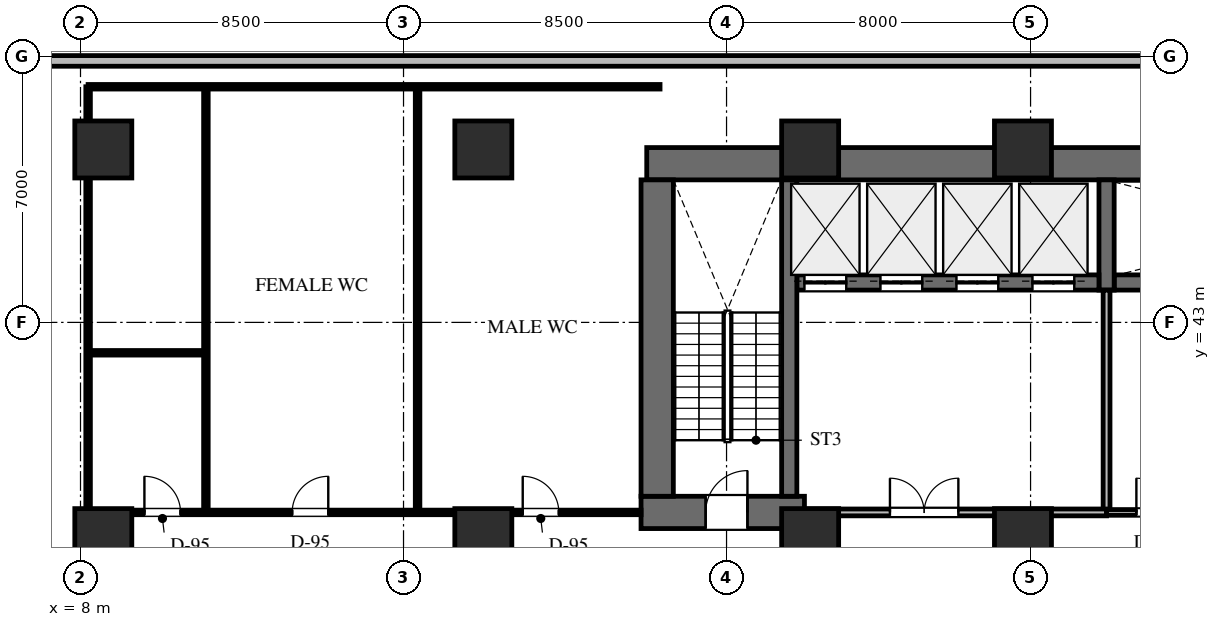
"""IFC4 building model, lengths in metres.
Left out: names, types, materials, properties, quantities, classifications, styles, units other than length and angle.
Written with IfcOpenShell. Run it as: python <this file> out.ifc"""

import sys

from ifc_helpers import new_model, si_unit, direction, frame, frame_2d, origin, origin_2d, place, context, subcontext, project, spatial, rectangle, extrude, element, fill, save


model = new_model("IFC4")
c1 = context("Model", 3, precision=1e-05, world=origin(), true_north=direction((0.0, 1.0)))
c2 = subcontext(c1, "Body", "Model", "MODEL_VIEW")
j1 = project(units=[si_unit("LENGTHUNIT", "METRE"), si_unit("PLANEANGLEUNIT", "RADIAN")], contexts=[c1])
p1 = place(None, origin())
s1 = spatial("IfcSite", under=j1, at=p1, CompositionType="ELEMENT")
p2 = place(p1, origin())
s2 = spatial("IfcBuilding", under=s1, at=p2, CompositionType="ELEMENT")
p3 = place(p2, frame((0.0, 0.0, 15.3)))
s3 = spatial("IfcBuildingStorey", under=s2, at=p3, CompositionType="ELEMENT", Elevation=15.3)
p4 = place(p3, frame((22.9, 47.175, 0.0), z_axis=(0.0, 0.0, 1.0), x_axis=(1.0, 0.0, 0.0)))
e1 = element("IfcWall", 1, at=p4, inside=s3, PredefinedType="SHEAR", context=c2, shape_type="SweptSolid", body=[
    extrude(rectangle(XDim=43.8, YDim=0.85, at=frame_2d((21.9, 0.0))), origin(), (0.0, 0.0, 1.0), 4.5),
])
p5 = place(p3, frame((35.2, 44.05, 0.0), z_axis=(0.0, 0.0, 1.0), x_axis=(1.0, 0.0, 0.0)))
e2 = element("IfcWall", 2, at=p5, inside=s3, PredefinedType="SHEAR", context=c2, shape_type="SweptSolid", body=[
    extrude(rectangle(XDim=9.65, YDim=0.4, at=frame_2d((4.825, 0.0))), origin(), (0.0, 0.0, 1.0), 4.5),
])
p6 = place(p3, frame((35.0, 43.85, 0.0), z_axis=(0.0, 0.0, 1.0), x_axis=(0.0, 1.0, 0.0)))
e3 = element("IfcWall", 3, at=p6, inside=s3, PredefinedType="SHEAR", context=c2, shape_type="SweptSolid", body=[
    extrude(rectangle(XDim=2.9, YDim=0.4, at=frame_2d((1.45, 0.0))), origin(), (0.0, 0.0, 1.0), 4.5),
])
p7 = place(p3, frame((26.85, 44.05, 0.0), z_axis=(0.0, 0.0, 1.0), x_axis=(1.0, 0.0, 0.0)))
e4 = element("IfcWall", 4, at=p7, inside=s3, PredefinedType="SHEAR", context=c2, shape_type="SweptSolid", body=[
    extrude(rectangle(XDim=7.95, YDim=0.4, at=frame_2d((3.975, 0.0))), origin(), (0.0, 0.0, 1.0), 4.5),
])
p8 = place(p7, frame((0.2, 0.0, 0.0)))
e5 = element("IfcOpeningElement", 5, at=p8, cuts=e4, PredefinedType="OPENING", context=c2, shape_type="SweptSolid", body=[
    extrude(rectangle(XDim=1.1, YDim=2.2, at=frame_2d((0.55, 1.1))), frame((0.0, 0.21, 0.0), z_axis=(0.0, -1.0, 0.0), x_axis=(1.0, 0.0, 0.0)), (0.0, 0.0, 1.0), 0.42),
])
p9 = place(p7, frame((2.2, 0.0, 0.0)))
e6 = element("IfcOpeningElement", 6, at=p9, cuts=e4, PredefinedType="OPENING", context=c2, shape_type="SweptSolid", body=[
    extrude(rectangle(XDim=1.1, YDim=2.2, at=frame_2d((0.55, 1.1))), frame((0.0, 0.21, 0.0), z_axis=(0.0, -1.0, 0.0), x_axis=(1.0, 0.0, 0.0)), (0.0, 0.0, 1.0), 0.42),
])
p10 = place(p7, frame((4.2, 0.0, 0.0)))
e7 = element("IfcOpeningElement", 7, at=p10, cuts=e4, PredefinedType="OPENING", context=c2, shape_type="SweptSolid", body=[
    extrude(rectangle(XDim=1.1, YDim=2.2, at=frame_2d((0.55, 1.1))), frame((0.0, 0.21, 0.0), z_axis=(0.0, -1.0, 0.0), x_axis=(1.0, 0.0, 0.0)), (0.0, 0.0, 1.0), 0.42),
])
p11 = place(p7, frame((6.2, 0.0, 0.0)))
e8 = element("IfcOpeningElement", 8, at=p11, cuts=e4, PredefinedType="OPENING", context=c2, shape_type="SweptSolid", body=[
    extrude(rectangle(XDim=1.1, YDim=2.2, at=frame_2d((0.55, 1.1))), frame((0.0, 0.21, 0.0), z_axis=(0.0, -1.0, 0.0), x_axis=(1.0, 0.0, 0.0)), (0.0, 0.0, 1.0), 0.42),
])
p12 = place(p3, frame((22.75, 38.0, 0.0), z_axis=(0.0, 0.0, 1.0), x_axis=(1.0, 0.0, 0.0)))
e9 = element("IfcWall", 9, at=p12, inside=s3, PredefinedType="SHEAR", context=c2, shape_type="SweptSolid", body=[
    extrude(rectangle(XDim=4.3, YDim=0.85, at=frame_2d((2.15, 0.0))), origin(), (0.0, 0.0, 1.0), 4.5),
])
p13 = place(p12, frame((1.7, 0.0, 0.0)))
e10 = element("IfcOpeningElement", 10, at=p13, cuts=e9, PredefinedType="OPENING", context=c2, shape_type="SweptSolid", body=[
    extrude(rectangle(XDim=1.1, YDim=2.2, at=frame_2d((0.55, 1.1))), frame((0.0, 0.435, 0.0), z_axis=(0.0, -1.0, 0.0), x_axis=(1.0, 0.0, 0.0)), (0.0, 0.0, 1.0), 0.87),
])
p14 = place(p3, frame((23.175, 38.425, 0.0), z_axis=(0.0, 0.0, 1.0), x_axis=(0.0, 1.0, 0.0)))
e11 = element("IfcWall", 11, at=p14, inside=s3, PredefinedType="SHEAR", context=c2, shape_type="SweptSolid", body=[
    extrude(rectangle(XDim=8.325, YDim=0.85, at=frame_2d((4.163, 0.0))), origin(), (0.0, 0.0, 1.0), 4.5),
])
p15 = place(p3, frame((26.65, 38.425, 0.0), z_axis=(0.0, 0.0, 1.0), x_axis=(0.0, 1.0, 0.0)))
e12 = element("IfcWall", 12, at=p15, inside=s3, PredefinedType="SHEAR", context=c2, shape_type="SweptSolid", body=[
    extrude(rectangle(XDim=8.325, YDim=0.4, at=frame_2d((4.163, 0.0))), origin(), (0.0, 0.0, 1.0), 4.5),
])
for number, where, z_axis, x_axis in (
    (13, (32.8, 37.35, 0.0), (0.0, 0.0, 1.0), (1.0, 0.0, 0.0)),
    (14, (32.8, 47.55, 0.0), (0.0, 0.0, 1.0), (1.0, 0.0, 0.0)),
    (15, (27.2, 37.35, 0.0), (0.0, 0.0, 1.0), (1.0, 0.0, 0.0)),
    (16, (27.2, 47.55, 0.0), (0.0, 0.0, 1.0), (1.0, 0.0, 0.0)),
    (17, (18.6, 37.35, 0.0), (0.0, 0.0, 1.0), (1.0, 0.0, 0.0)),
    (18, (18.6, 47.55, 0.0), (0.0, 0.0, 1.0), (1.0, 0.0, 0.0)),
    (19, (8.6, 37.35, 0.0), (0.0, 0.0, 1.0), (1.0, 0.0, 0.0)),
    (20, (8.6, 47.55, 0.0), (0.0, 0.0, 1.0), (1.0, 0.0, 0.0)),
):
    element("IfcColumn", number, at=place(p3, frame(where, z_axis=z_axis, x_axis=x_axis)), inside=s3, PredefinedType="COLUMN", context=c2, shape_type="SweptSolid", body=[
        extrude(rectangle(XDim=1.5, YDim=1.5, at=origin_2d()), origin(), (0.0, 0.0, 1.0), 4.5),
    ])
p16 = place(p3, frame((2.65, 49.88, 0.0), z_axis=(0.0, 0.0, 1.0), x_axis=(1.0, 0.0, 0.0)))
e21 = element("IfcWall", 21, at=p16, inside=s3, PredefinedType="STANDARD", context=c2, shape_type="SweptSolid", body=[
    extrude(rectangle(XDim=68.701, YDim=0.28, at=frame_2d((34.35, 0.0))), origin(), (0.0, 0.0, 1.0), 4.23),
])
p17 = place(p3, frame((35.0, 38.0, 0.0), z_axis=(0.0, 0.0, 1.0), x_axis=(0.0, 1.0, 0.0)))
e22 = element("IfcWall", 22, at=p17, inside=s3, PredefinedType="STANDARD", context=c2, shape_type="SweptSolid", body=[
    extrude(rectangle(XDim=5.85, YDim=0.18, at=frame_2d((2.925, 0.0))), origin(), (0.0, 0.0, 1.0), 4.23),
])
p18 = place(p3, frame((27.05, 38.0, 0.0), z_axis=(0.0, 0.0, 1.0), x_axis=(1.0, 0.0, 0.0)))
e23 = element("IfcWall", 23, at=p18, inside=s3, PredefinedType="STANDARD", context=c2, shape_type="SweptSolid", body=[
    extrude(rectangle(XDim=7.95, YDim=0.18, at=frame_2d((3.975, 0.0))), origin(), (0.0, 0.0, 1.0), 3.282),
])
p19 = place(p18, frame((2.25, 0.0, 0.0)))
e24 = element("IfcOpeningElement", 24, at=p19, cuts=e23, PredefinedType="OPENING", context=c2, shape_type="SweptSolid", body=[
    extrude(rectangle(XDim=1.8, YDim=2.2, at=frame_2d((0.9, 1.1))), frame((0.0, 0.1, 0.0), z_axis=(0.0, -1.0, 0.0), x_axis=(1.0, 0.0, 0.0)), (0.0, 0.0, 1.0), 0.2),
])
p20 = place(p3, frame((35.0, 38.0, 0.0), z_axis=(0.0, 0.0, 1.0), x_axis=(1.0, 0.0, 0.0)))
e25 = element("IfcWall", 25, at=p20, inside=s3, PredefinedType="PARTITIONING", context=c2, shape_type="SweptSolid", body=[
    extrude(rectangle(XDim=10.05, YDim=0.15, at=frame_2d((5.025, 0.0))), origin(), (0.0, 0.0, 1.0), 3.282),
])
p21 = place(p20, frame((0.785, 0.0, 0.0)))
e26 = element("IfcOpeningElement", 26, at=p21, cuts=e25, PredefinedType="OPENING", context=c2, shape_type="SweptSolid", body=[
    extrude(rectangle(XDim=0.9, YDim=2.1, at=frame_2d((0.45, 1.05))), frame((0.0, 0.085, 0.0), z_axis=(0.0, -1.0, 0.0), x_axis=(1.0, 0.0, 0.0)), (0.0, 0.0, 1.0), 0.17),
])
p22 = place(p20, frame((6.225, 0.0, 0.0)))
e27 = element("IfcOpeningElement", 27, at=p22, cuts=e25, PredefinedType="OPENING", context=c2, shape_type="SweptSolid", body=[
    extrude(rectangle(XDim=1.05, YDim=2.2, at=frame_2d((0.525, 1.1))), frame((0.0, 0.085, 0.0), z_axis=(0.0, -1.0, 0.0), x_axis=(1.0, 0.0, 0.0)), (0.0, 0.0, 1.0), 0.17),
])
p23 = place(p3, frame((8.2, 38.0, 0.0), z_axis=(0.0, 0.0, 1.0), x_axis=(1.0, 0.0, 0.0)))
e28 = element("IfcWall", 28, at=p23, inside=s3, PredefinedType="PARTITIONING", context=c2, shape_type="SweptSolid", body=[
    extrude(rectangle(XDim=14.55, YDim=0.12, at=frame_2d((7.275, 0.0))), origin(), (0.0, 0.0, 1.0), 3.282),
])
p24 = place(p23, frame((1.482, 0.0, 0.0)))
e29 = element("IfcOpeningElement", 29, at=p24, cuts=e28, PredefinedType="OPENING", context=c2, shape_type="SweptSolid", body=[
    extrude(rectangle(XDim=0.95, YDim=2.15, at=frame_2d((0.475, 1.075))), frame((0.0, 0.07, 0.0), z_axis=(0.0, -1.0, 0.0), x_axis=(1.0, 0.0, 0.0)), (0.0, 0.0, 1.0), 0.14),
])
p25 = place(p23, frame((5.37, 0.0, 0.0)))
e30 = element("IfcOpeningElement", 30, at=p25, cuts=e28, PredefinedType="OPENING", context=c2, shape_type="SweptSolid", body=[
    extrude(rectangle(XDim=0.95, YDim=2.15, at=frame_2d((0.475, 1.075))), frame((0.0, 0.07, 0.0), z_axis=(0.0, -1.0, 0.0), x_axis=(1.0, 0.0, 0.0)), (0.0, 0.0, 1.0), 0.14),
])
p26 = place(p23, frame((11.437, 0.0, 0.0)))
e31 = element("IfcOpeningElement", 31, at=p26, cuts=e28, PredefinedType="OPENING", context=c2, shape_type="SweptSolid", body=[
    extrude(rectangle(XDim=0.95, YDim=2.15, at=frame_2d((0.475, 1.075))), frame((0.0, 0.07, 0.0), z_axis=(0.0, -1.0, 0.0), x_axis=(1.0, 0.0, 0.0)), (0.0, 0.0, 1.0), 0.14),
])
p27 = place(p3, frame((8.2, 38.0, 0.0), z_axis=(0.0, 0.0, 1.0), x_axis=(0.0, 1.0, 0.0)))
e32 = element("IfcWall", 32, at=p27, inside=s3, PredefinedType="PARTITIONING", context=c2, shape_type="SweptSolid", body=[
    extrude(rectangle(XDim=11.2, YDim=0.12, at=frame_2d((5.6, 0.0))), origin(), (0.0, 0.0, 1.0), 4.23),
])
p28 = place(p3, frame((8.2, 49.2, 0.0), z_axis=(0.0, 0.0, 1.0), x_axis=(1.0, 0.0, 0.0)))
e33 = element("IfcWall", 33, at=p28, inside=s3, PredefinedType="PARTITIONING", context=c2, shape_type="SweptSolid", body=[
    extrude(rectangle(XDim=15.05, YDim=0.12, at=frame_2d((7.525, 0.0))), origin(), (0.0, 0.0, 1.0), 4.23),
])
for number, where, z_axis, x_axis in (
    (34, (11.3, 38.068, 0.0), (0.0, 0.0, 1.0), (0.0, 1.0, 0.0)),
    (35, (16.87, 38.068, 0.0), (0.0, 0.0, 1.0), (0.0, 1.0, 0.0)),
):
    element("IfcWall", number, at=place(p3, frame(where, z_axis=z_axis, x_axis=x_axis)), inside=s3, PredefinedType="PARTITIONING", context=c2, shape_type="SweptSolid", body=[
        extrude(rectangle(XDim=11.064, YDim=0.12, at=frame_2d((5.532, 0.0))), origin(), (0.0, 0.0, 1.0), 3.282),
    ])
p29 = place(p3, frame((8.268, 42.2, 0.0), z_axis=(0.0, 0.0, 1.0), x_axis=(1.0, 0.0, 0.0)))
e36 = element("IfcWall", 36, at=p29, inside=s3, PredefinedType="PARTITIONING", context=c2, shape_type="SweptSolid", body=[
    extrude(rectangle(XDim=2.964, YDim=0.12, at=frame_2d((1.482, 0.0))), origin(), (0.0, 0.0, 1.0), 3.282),
])
p30 = place(p13, origin())
e37 = element("IfcDoor", 37, at=p30, inside=s3, OperationType="SINGLE_SWING_RIGHT", PredefinedType="DOOR", context=c2, shape_type="SweptSolid", body=[
    extrude(rectangle(XDim=1.1, YDim=2.2, at=frame_2d((0.55, 1.1))), frame((0.0, 0.025, 0.0), z_axis=(0.0, -1.0, 0.0), x_axis=(1.0, 0.0, 0.0)), (0.0, 0.0, 1.0), 0.05),
])
fill(e10, e37)
p31 = place(p8, origin())
e38 = element("IfcDoor", 38, at=p31, inside=s3, OperationType="DOUBLE_DOOR_SLIDING", PredefinedType="DOOR", context=c2, shape_type="SweptSolid", body=[
    extrude(rectangle(XDim=1.1, YDim=2.2, at=frame_2d((0.55, 1.1))), frame((0.0, 0.025, 0.0), z_axis=(0.0, -1.0, 0.0), x_axis=(1.0, 0.0, 0.0)), (0.0, 0.0, 1.0), 0.05),
])
fill(e5, e38)
p32 = place(p9, origin())
e39 = element("IfcDoor", 39, at=p32, inside=s3, OperationType="DOUBLE_DOOR_SLIDING", PredefinedType="DOOR", context=c2, shape_type="SweptSolid", body=[
    extrude(rectangle(XDim=1.1, YDim=2.2, at=frame_2d((0.55, 1.1))), frame((0.0, 0.025, 0.0), z_axis=(0.0, -1.0, 0.0), x_axis=(1.0, 0.0, 0.0)), (0.0, 0.0, 1.0), 0.05),
])
fill(e6, e39)
p33 = place(p10, origin())
e40 = element("IfcDoor", 40, at=p33, inside=s3, OperationType="DOUBLE_DOOR_SLIDING", PredefinedType="DOOR", context=c2, shape_type="SweptSolid", body=[
    extrude(rectangle(XDim=1.1, YDim=2.2, at=frame_2d((0.55, 1.1))), frame((0.0, 0.025, 0.0), z_axis=(0.0, -1.0, 0.0), x_axis=(1.0, 0.0, 0.0)), (0.0, 0.0, 1.0), 0.05),
])
fill(e7, e40)
p34 = place(p11, origin())
e41 = element("IfcDoor", 41, at=p34, inside=s3, OperationType="DOUBLE_DOOR_SLIDING", PredefinedType="DOOR", context=c2, shape_type="SweptSolid", body=[
    extrude(rectangle(XDim=1.1, YDim=2.2, at=frame_2d((0.55, 1.1))), frame((0.0, 0.025, 0.0), z_axis=(0.0, -1.0, 0.0), x_axis=(1.0, 0.0, 0.0)), (0.0, 0.0, 1.0), 0.05),
])
fill(e8, e41)
p35 = place(p19, origin())
e42 = element("IfcDoor", 42, at=p35, inside=s3, OperationType="DOUBLE_DOOR_SINGLE_SWING", PredefinedType="DOOR", context=c2, shape_type="SweptSolid", body=[
    extrude(rectangle(XDim=1.8, YDim=2.2, at=frame_2d((0.9, 1.1))), frame((0.0, 0.025, 0.0), z_axis=(0.0, -1.0, 0.0), x_axis=(1.0, 0.0, 0.0)), (0.0, 0.0, 1.0), 0.05),
])
fill(e24, e42)
p36 = place(p21, origin())
e43 = element("IfcDoor", 43, at=p36, inside=s3, OperationType="SINGLE_SWING_LEFT", PredefinedType="DOOR", context=c2, shape_type="SweptSolid", body=[
    extrude(rectangle(XDim=0.9, YDim=2.1, at=frame_2d((0.45, 1.05))), frame((0.0, 0.025, 0.0), z_axis=(0.0, -1.0, 0.0), x_axis=(1.0, 0.0, 0.0)), (0.0, 0.0, 1.0), 0.05),
])
fill(e26, e43)
p37 = place(p24, origin())
e44 = element("IfcDoor", 44, at=p37, inside=s3, OperationType="SINGLE_SWING_LEFT", PredefinedType="DOOR", context=c2, shape_type="SweptSolid", body=[
    extrude(rectangle(XDim=0.95, YDim=2.15, at=frame_2d((0.475, 1.075))), frame((0.0, 0.025, 0.0), z_axis=(0.0, -1.0, 0.0), x_axis=(1.0, 0.0, 0.0)), (0.0, 0.0, 1.0), 0.05),
])
fill(e29, e44)
p38 = place(p25, origin())
e45 = element("IfcDoor", 45, at=p38, inside=s3, OperationType="SINGLE_SWING_RIGHT", PredefinedType="DOOR", context=c2, shape_type="SweptSolid", body=[
    extrude(rectangle(XDim=0.95, YDim=2.15, at=frame_2d((0.475, 1.075))), frame((0.0, 0.025, 0.0), z_axis=(0.0, -1.0, 0.0), x_axis=(1.0, 0.0, 0.0)), (0.0, 0.0, 1.0), 0.05),
])
fill(e30, e45)
p39 = place(p26, origin())
e46 = element("IfcDoor", 46, at=p39, inside=s3, OperationType="SINGLE_SWING_LEFT", PredefinedType="DOOR", context=c2, shape_type="SweptSolid", body=[
    extrude(rectangle(XDim=0.95, YDim=2.15, at=frame_2d((0.475, 1.075))), frame((0.0, 0.025, 0.0), z_axis=(0.0, -1.0, 0.0), x_axis=(1.0, 0.0, 0.0)), (0.0, 0.0, 1.0), 0.05),
])
fill(e31, e46)
save(model, sys.argv[1])
